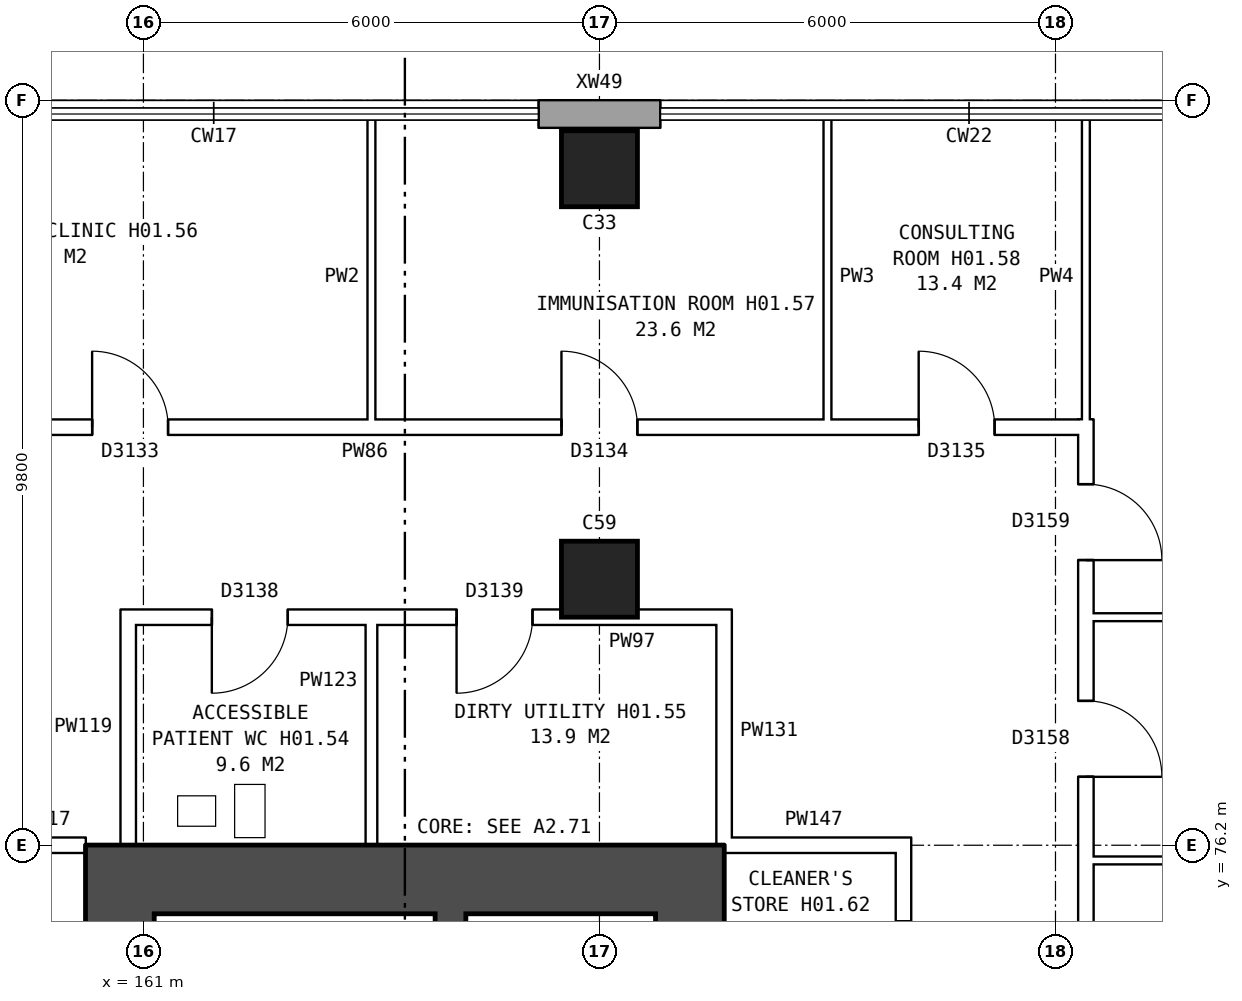
"""IFC4 building model, lengths in metres.
Left out: names, types, materials, properties, quantities, classifications, styles, units other than length and angle.
Written with IfcOpenShell. Run it as: python <this file> out.ifc"""

import sys

from ifc_helpers import new_model, si_unit, direction, frame, frame_2d, origin, origin_2d, place, context, subcontext, project, spatial, rectangle, extrude, element, fill, save


model = new_model("IFC4")
c1 = context("Model", 3, precision=1e-05, world=origin(), true_north=direction((0.0, 1.0)))
c2 = subcontext(c1, "Body", "Model", "MODEL_VIEW")
j1 = project(units=[si_unit("LENGTHUNIT", "METRE"), si_unit("PLANEANGLEUNIT", "RADIAN")], contexts=[c1])
p1 = place(None, origin())
s1 = spatial("IfcSite", under=j1, at=p1, CompositionType="ELEMENT")
p2 = place(p1, origin())
s2 = spatial("IfcBuilding", under=s1, at=p2, CompositionType="ELEMENT")
p3 = place(p2, frame((0.0, 0.0, 5.5)))
s3 = spatial("IfcBuildingStorey", under=s2, at=p3, CompositionType="ELEMENT", Elevation=5.5)
for number, where, z_axis, x_axis in (
    (1, (167.0, 79.7, 0.0), (0.0, 0.0, 1.0), (1.0, 0.0, 0.0)),
    (2, (167.0, 85.1, 0.0), (0.0, 0.0, 1.0), (1.0, 0.0, 0.0)),
):
    element("IfcColumn", number, at=place(p3, frame(where, z_axis=z_axis, x_axis=x_axis)), inside=s3, PredefinedType="COLUMN", context=c2, shape_type="SweptSolid", body=[
        extrude(rectangle(XDim=1.0, YDim=1.0, at=origin_2d()), origin(), (0.0, 0.0, 1.0), 4.3),
    ])
p4 = place(p3, frame((167.8, 85.82, 0.0), z_axis=(0.0, 0.0, 1.0), x_axis=(-1.0, 0.0, 0.0)))
e3 = element("IfcWall", 3, at=p4, inside=s3, PredefinedType="STANDARD", context=c2, shape_type="SweptSolid", body=[
    extrude(rectangle(XDim=1.6, YDim=0.36, at=frame_2d((0.8, 0.0))), origin(), (0.0, 0.0, 1.0), 4.3),
])
p5 = place(p3, frame((160.69, 75.3, 0.0), z_axis=(0.0, 0.0, 1.0), x_axis=(0.0, -1.0, 0.0)))
e4 = element("IfcWall", 4, at=p5, inside=s3, PredefinedType="SHEAR", context=c2, shape_type="SweptSolid", body=[
    extrude(rectangle(XDim=10.6, YDim=0.9, at=frame_2d((5.3, 0.0))), origin(), (0.0, 0.0, 1.0), 4.3),
])
p6 = place(p5, frame((0.425, 0.0, 0.0)))
e5 = element("IfcOpeningElement", 5, at=p6, cuts=e4, PredefinedType="OPENING", context=c2, shape_type="SweptSolid", body=[
    extrude(rectangle(XDim=1.1, YDim=2.1, at=frame_2d((0.55, 1.05))), frame((0.0, 0.46, 0.0), z_axis=(0.0, -1.0, 0.0), x_axis=(1.0, 0.0, 0.0)), (0.0, 0.0, 1.0), 0.92),
])
p7 = place(p5, frame((2.7, 0.0, 0.0)))
e6 = element("IfcOpeningElement", 6, at=p7, cuts=e4, PredefinedType="OPENING", context=c2, shape_type="SweptSolid", body=[
    extrude(rectangle(XDim=1.1, YDim=2.1, at=frame_2d((0.55, 1.05))), frame((0.0, 0.46, 0.0), z_axis=(0.0, -1.0, 0.0), x_axis=(1.0, 0.0, 0.0)), (0.0, 0.0, 1.0), 0.92),
])
p8 = place(p5, frame((4.9, 0.0, 0.0)))
e7 = element("IfcOpeningElement", 7, at=p8, cuts=e4, PredefinedType="OPENING", context=c2, shape_type="SweptSolid", body=[
    extrude(rectangle(XDim=1.1, YDim=2.1, at=frame_2d((0.55, 1.05))), frame((0.0, 0.46, 0.0), z_axis=(0.0, -1.0, 0.0), x_axis=(1.0, 0.0, 0.0)), (0.0, 0.0, 1.0), 0.92),
])
p9 = place(p5, frame((9.0, 0.0, 0.0)))
e8 = element("IfcOpeningElement", 8, at=p9, cuts=e4, PredefinedType="OPENING", context=c2, shape_type="SweptSolid", body=[
    extrude(rectangle(XDim=1.1, YDim=2.1, at=frame_2d((0.55, 1.05))), frame((0.0, 0.46, 0.0), z_axis=(0.0, -1.0, 0.0), x_axis=(1.0, 0.0, 0.0)), (0.0, 0.0, 1.0), 0.92),
])
p10 = place(p5, frame((7.225, 0.0, 0.0)))
e9 = element("IfcOpeningElement", 9, at=p10, cuts=e4, PredefinedType="OPENING", context=c2, shape_type="SweptSolid", body=[
    extrude(rectangle(XDim=0.85, YDim=2.1, at=frame_2d((0.425, 1.05))), frame((0.0, 0.46, 0.0), z_axis=(0.0, -1.0, 0.0), x_axis=(1.0, 0.0, 0.0)), (0.0, 0.0, 1.0), 0.92),
])
p11 = place(p3, frame((168.19, 75.3, 0.0), z_axis=(0.0, 0.0, 1.0), x_axis=(0.0, -1.0, 0.0)))
e10 = element("IfcWall", 10, at=p11, inside=s3, PredefinedType="SHEAR", context=c2, shape_type="SweptSolid", body=[
    extrude(rectangle(XDim=10.6, YDim=0.9, at=frame_2d((5.3, 0.0))), origin(), (0.0, 0.0, 1.0), 4.3),
])
p12 = place(p3, frame((160.24, 75.75, 0.0), z_axis=(0.0, 0.0, 1.0), x_axis=(1.0, 0.0, 0.0)))
e11 = element("IfcWall", 11, at=p12, inside=s3, PredefinedType="SHEAR", context=c2, shape_type="SweptSolid", body=[
    extrude(rectangle(XDim=8.4, YDim=0.9, at=frame_2d((4.2, 0.0))), origin(), (0.0, 0.0, 1.0), 4.3),
])
p13 = place(p3, frame((165.04, 75.3, 0.0), z_axis=(0.0, 0.0, 1.0), x_axis=(0.0, -1.0, 0.0)))
e12 = element("IfcWall", 12, at=p13, inside=s3, PredefinedType="SHEAR", context=c2, shape_type="SweptSolid", body=[
    extrude(rectangle(XDim=6.35, YDim=0.4, at=frame_2d((3.175, 0.0))), origin(), (0.0, 0.0, 1.0), 4.3),
])
p14 = place(p3, frame((173.3, 76.0, 0.0), z_axis=(0.0, 0.0, 1.0), x_axis=(1.0, 0.0, 0.0)))
e13 = element("IfcWall", 13, at=p14, inside=s3, PredefinedType="PARTITIONING", context=c2, shape_type="SweptSolid", body=[
    extrude(rectangle(XDim=5.46, YDim=0.1, at=frame_2d((2.73, 0.0))), origin(), (0.0, 0.0, 1.0), 4.3),
])
p15 = place(p3, frame((168.54, 76.2, 0.0), z_axis=(0.0, 0.0, 1.0), x_axis=(1.0, 0.0, 0.0)))
e14 = element("IfcWall", 14, at=p15, inside=s3, PredefinedType="PARTITIONING", context=c2, shape_type="SweptSolid", body=[
    extrude(rectangle(XDim=2.56, YDim=0.2, at=frame_2d((1.28, 0.0))), origin(), (0.0, 0.0, 1.0), 4.3),
])
p16 = place(p3, frame((157.65, 76.2, 0.0), z_axis=(0.0, 0.0, 1.0), x_axis=(1.0, 0.0, 0.0)))
e15 = element("IfcWall", 15, at=p16, inside=s3, PredefinedType="PARTITIONING", context=c2, shape_type="SweptSolid", body=[
    extrude(rectangle(XDim=2.59, YDim=0.2, at=frame_2d((1.295, 0.0))), origin(), (0.0, 0.0, 1.0), 4.3),
])
p17 = place(p16, frame((0.59, 0.0, 0.0)))
e16 = element("IfcOpeningElement", 16, at=p17, cuts=e15, PredefinedType="OPENING", context=c2, shape_type="SweptSolid", body=[
    extrude(rectangle(XDim=1.0, YDim=2.1, at=frame_2d((0.5, 1.05))), frame((0.0, 0.11, 0.0), z_axis=(0.0, -1.0, 0.0), x_axis=(1.0, 0.0, 0.0)), (0.0, 0.0, 1.0), 0.22),
])
p18 = place(p3, frame((160.7, 79.2, 0.0), z_axis=(0.0, 0.0, 1.0), x_axis=(1.0, 0.0, 0.0)))
e17 = element("IfcWall", 17, at=p18, inside=s3, PredefinedType="PARTITIONING", context=c2, shape_type="SweptSolid", body=[
    extrude(rectangle(XDim=8.04, YDim=0.2, at=frame_2d((4.02, 0.0))), origin(), (0.0, 0.0, 1.0), 4.3),
])
p19 = place(p18, frame((1.2, 0.0, 0.0)))
e18 = element("IfcOpeningElement", 18, at=p19, cuts=e17, PredefinedType="OPENING", context=c2, shape_type="SweptSolid", body=[
    extrude(rectangle(XDim=1.0, YDim=2.1, at=frame_2d((0.5, 1.05))), frame((0.0, 0.11, 0.0), z_axis=(0.0, -1.0, 0.0), x_axis=(1.0, 0.0, 0.0)), (0.0, 0.0, 1.0), 0.22),
])
p20 = place(p18, frame((4.42, 0.0, 0.0)))
e19 = element("IfcOpeningElement", 19, at=p20, cuts=e17, PredefinedType="OPENING", context=c2, shape_type="SweptSolid", body=[
    extrude(rectangle(XDim=1.0, YDim=2.1, at=frame_2d((0.5, 1.05))), frame((0.0, 0.11, 0.0), z_axis=(0.0, -1.0, 0.0), x_axis=(1.0, 0.0, 0.0)), (0.0, 0.0, 1.0), 0.22),
])
p21 = place(p3, frame((173.3, 79.2, 0.0), z_axis=(0.0, 0.0, 1.0), x_axis=(1.0, 0.0, 0.0)))
e20 = element("IfcWall", 20, at=p21, inside=s3, PredefinedType="PARTITIONING", context=c2, shape_type="SweptSolid", body=[
    extrude(rectangle(XDim=5.46, YDim=0.1, at=frame_2d((2.73, 0.0))), origin(), (0.0, 0.0, 1.0), 4.3),
])
p22 = place(p3, frame((157.53, 81.7, 0.0), z_axis=(0.0, 0.0, 1.0), x_axis=(1.0, 0.0, 0.0)))
e21 = element("IfcWall", 21, at=p22, inside=s3, PredefinedType="PARTITIONING", context=c2, shape_type="SweptSolid", body=[
    extrude(rectangle(XDim=15.97, YDim=0.2, at=frame_2d((7.985, 0.0))), origin(), (0.0, 0.0, 1.0), 4.3),
])
p23 = place(p22, frame((2.795, 0.0, 0.0)))
e22 = element("IfcOpeningElement", 22, at=p23, cuts=e21, PredefinedType="OPENING", context=c2, shape_type="SweptSolid", body=[
    extrude(rectangle(XDim=1.0, YDim=2.1, at=frame_2d((0.5, 1.05))), frame((0.0, 0.11, 0.0), z_axis=(0.0, -1.0, 0.0), x_axis=(1.0, 0.0, 0.0)), (0.0, 0.0, 1.0), 0.22),
])
p24 = place(p22, frame((8.97, 0.0, 0.0)))
e23 = element("IfcOpeningElement", 23, at=p24, cuts=e21, PredefinedType="OPENING", context=c2, shape_type="SweptSolid", body=[
    extrude(rectangle(XDim=1.0, YDim=2.1, at=frame_2d((0.5, 1.05))), frame((0.0, 0.11, 0.0), z_axis=(0.0, -1.0, 0.0), x_axis=(1.0, 0.0, 0.0)), (0.0, 0.0, 1.0), 0.22),
])
p25 = place(p22, frame((13.67, 0.0, 0.0)))
e24 = element("IfcOpeningElement", 24, at=p25, cuts=e21, PredefinedType="OPENING", context=c2, shape_type="SweptSolid", body=[
    extrude(rectangle(XDim=1.0, YDim=2.1, at=frame_2d((0.5, 1.05))), frame((0.0, 0.11, 0.0), z_axis=(0.0, -1.0, 0.0), x_axis=(1.0, 0.0, 0.0)), (0.0, 0.0, 1.0), 0.22),
])
p26 = place(p3, frame((160.8, 76.2, 0.0), z_axis=(0.0, 0.0, 1.0), x_axis=(0.0, 1.0, 0.0)))
e25 = element("IfcWall", 25, at=p26, inside=s3, PredefinedType="PARTITIONING", context=c2, shape_type="SweptSolid", body=[
    extrude(rectangle(XDim=3.1, YDim=0.2, at=frame_2d((1.55, 0.0))), origin(), (0.0, 0.0, 1.0), 4.3),
])
p27 = place(p3, frame((164.0, 81.6, 0.0), z_axis=(0.0, 0.0, 1.0), x_axis=(0.0, 1.0, 0.0)))
e26 = element("IfcWall", 26, at=p27, inside=s3, PredefinedType="PARTITIONING", context=c2, shape_type="SweptSolid", body=[
    extrude(rectangle(XDim=4.16, YDim=0.1, at=frame_2d((2.08, 0.0))), origin(), (0.0, 0.0, 1.0), 4.3),
])
p28 = place(p3, frame((164.0, 76.2, 0.0), z_axis=(0.0, 0.0, 1.0), x_axis=(0.0, 1.0, 0.0)))
e27 = element("IfcWall", 27, at=p28, inside=s3, PredefinedType="PLUMBINGWALL", context=c2, shape_type="SweptSolid", body=[
    extrude(rectangle(XDim=3.1, YDim=0.15, at=frame_2d((1.55, 0.0))), origin(), (0.0, 0.0, 1.0), 4.3),
])
p29 = place(p3, frame((168.64, 76.1, 0.0), z_axis=(0.0, 0.0, 1.0), x_axis=(0.0, 1.0, 0.0)))
e28 = element("IfcWall", 28, at=p29, inside=s3, PredefinedType="PARTITIONING", context=c2, shape_type="SweptSolid", body=[
    extrude(rectangle(XDim=3.2, YDim=0.2, at=frame_2d((1.6, 0.0))), origin(), (0.0, 0.0, 1.0), 4.3),
])
p30 = place(p3, frame((170.0, 81.6, 0.0), z_axis=(0.0, 0.0, 1.0), x_axis=(0.0, 1.0, 0.0)))
e29 = element("IfcWall", 29, at=p30, inside=s3, PredefinedType="PARTITIONING", context=c2, shape_type="SweptSolid", body=[
    extrude(rectangle(XDim=4.16, YDim=0.1, at=frame_2d((2.08, 0.0))), origin(), (0.0, 0.0, 1.0), 4.3),
])
p31 = place(p3, frame((171.0, 69.9, 0.0), z_axis=(0.0, 0.0, 1.0), x_axis=(0.0, 1.0, 0.0)))
e30 = element("IfcWall", 30, at=p31, inside=s3, PredefinedType="PARTITIONING", context=c2, shape_type="SweptSolid", body=[
    extrude(rectangle(XDim=6.4, YDim=0.2, at=frame_2d((3.2, 0.0))), origin(), (0.0, 0.0, 1.0), 4.3),
])
p32 = place(p31, frame((1.2, 0.0, 0.0)))
e31 = element("IfcOpeningElement", 31, at=p32, cuts=e30, PredefinedType="OPENING", context=c2, shape_type="SweptSolid", body=[
    extrude(rectangle(XDim=1.0, YDim=2.1, at=frame_2d((0.5, 1.05))), frame((0.0, 0.11, 0.0), z_axis=(0.0, -1.0, 0.0), x_axis=(1.0, 0.0, 0.0)), (0.0, 0.0, 1.0), 0.22),
])
p33 = place(p31, frame((4.3, 0.0, 0.0)))
e32 = element("IfcOpeningElement", 32, at=p33, cuts=e30, PredefinedType="OPENING", context=c2, shape_type="SweptSolid", body=[
    extrude(rectangle(XDim=1.0, YDim=2.1, at=frame_2d((0.5, 1.05))), frame((0.0, 0.11, 0.0), z_axis=(0.0, -1.0, 0.0), x_axis=(1.0, 0.0, 0.0)), (0.0, 0.0, 1.0), 0.22),
])
p34 = place(p3, frame((173.4, 58.198, 0.0), z_axis=(0.0, 0.0, 1.0), x_axis=(0.0, 1.0, 0.0)))
e33 = element("IfcWall", 33, at=p34, inside=s3, PredefinedType="PARTITIONING", context=c2, shape_type="SweptSolid", body=[
    extrude(rectangle(XDim=23.604, YDim=0.2, at=frame_2d((11.802, 0.0))), origin(), (0.0, 0.0, 1.0), 4.3),
])
p35 = place(p34, frame((0.851, 0.0, 0.0)))
e34 = element("IfcOpeningElement", 34, at=p35, cuts=e33, PredefinedType="OPENING", context=c2, shape_type="SweptSolid", body=[
    extrude(rectangle(XDim=1.0, YDim=2.1, at=frame_2d((0.5, 1.05))), frame((0.0, 0.11, 0.0), z_axis=(0.0, -1.0, 0.0), x_axis=(1.0, 0.0, 0.0)), (0.0, 0.0, 1.0), 0.22),
])
p36 = place(p34, frame((3.702, 0.0, 0.0)))
e35 = element("IfcOpeningElement", 35, at=p36, cuts=e33, PredefinedType="OPENING", context=c2, shape_type="SweptSolid", body=[
    extrude(rectangle(XDim=1.0, YDim=2.1, at=frame_2d((0.5, 1.05))), frame((0.0, 0.11, 0.0), z_axis=(0.0, -1.0, 0.0), x_axis=(1.0, 0.0, 0.0)), (0.0, 0.0, 1.0), 0.22),
])
p37 = place(p34, frame((6.802, 0.0, 0.0)))
e36 = element("IfcOpeningElement", 36, at=p37, cuts=e33, PredefinedType="OPENING", context=c2, shape_type="SweptSolid", body=[
    extrude(rectangle(XDim=1.0, YDim=2.1, at=frame_2d((0.5, 1.05))), frame((0.0, 0.11, 0.0), z_axis=(0.0, -1.0, 0.0), x_axis=(1.0, 0.0, 0.0)), (0.0, 0.0, 1.0), 0.22),
])
p38 = place(p34, frame((9.802, 0.0, 0.0)))
e37 = element("IfcOpeningElement", 37, at=p38, cuts=e33, PredefinedType="OPENING", context=c2, shape_type="SweptSolid", body=[
    extrude(rectangle(XDim=1.0, YDim=2.1, at=frame_2d((0.5, 1.05))), frame((0.0, 0.11, 0.0), z_axis=(0.0, -1.0, 0.0), x_axis=(1.0, 0.0, 0.0)), (0.0, 0.0, 1.0), 0.22),
])
p39 = place(p34, frame((12.802, 0.0, 0.0)))
e38 = element("IfcOpeningElement", 38, at=p39, cuts=e33, PredefinedType="OPENING", context=c2, shape_type="SweptSolid", body=[
    extrude(rectangle(XDim=1.0, YDim=2.1, at=frame_2d((0.5, 1.05))), frame((0.0, 0.11, 0.0), z_axis=(0.0, -1.0, 0.0), x_axis=(1.0, 0.0, 0.0)), (0.0, 0.0, 1.0), 0.22),
])
p40 = place(p34, frame((15.802, 0.0, 0.0)))
e39 = element("IfcOpeningElement", 39, at=p40, cuts=e33, PredefinedType="OPENING", context=c2, shape_type="SweptSolid", body=[
    extrude(rectangle(XDim=1.0, YDim=2.1, at=frame_2d((0.5, 1.05))), frame((0.0, 0.11, 0.0), z_axis=(0.0, -1.0, 0.0), x_axis=(1.0, 0.0, 0.0)), (0.0, 0.0, 1.0), 0.22),
])
p41 = place(p34, frame((18.902, 0.0, 0.0)))
e40 = element("IfcOpeningElement", 40, at=p41, cuts=e33, PredefinedType="OPENING", context=c2, shape_type="SweptSolid", body=[
    extrude(rectangle(XDim=1.0, YDim=2.1, at=frame_2d((0.5, 1.05))), frame((0.0, 0.11, 0.0), z_axis=(0.0, -1.0, 0.0), x_axis=(1.0, 0.0, 0.0)), (0.0, 0.0, 1.0), 0.22),
])
p42 = place(p34, frame((21.753, 0.0, 0.0)))
e41 = element("IfcOpeningElement", 41, at=p42, cuts=e33, PredefinedType="OPENING", context=c2, shape_type="SweptSolid", body=[
    extrude(rectangle(XDim=1.0, YDim=2.1, at=frame_2d((0.5, 1.05))), frame((0.0, 0.11, 0.0), z_axis=(0.0, -1.0, 0.0), x_axis=(1.0, 0.0, 0.0)), (0.0, 0.0, 1.0), 0.22),
])
p43 = place(p3, frame((173.4, 81.598, 0.0), z_axis=(0.0, 0.0, 1.0), x_axis=(0.0, 1.0, 0.0)))
e42 = element("IfcWall", 42, at=p43, inside=s3, PredefinedType="PARTITIONING", context=c2, shape_type="SweptSolid", body=[
    extrude(rectangle(XDim=4.162, YDim=0.1, at=frame_2d((2.081, 0.0))), origin(), (0.0, 0.0, 1.0), 4.3),
])
p44 = place(p19, frame((1.0, 0.0, 0.0), z_axis=(0.0, 0.0, 1.0), x_axis=(-1.0, 0.0, 0.0)))
e43 = element("IfcDoor", 43, at=p44, inside=s3, OperationType="SINGLE_SWING_RIGHT", PredefinedType="DOOR", context=c2, shape_type="SweptSolid", body=[
    extrude(rectangle(XDim=1.0, YDim=2.1, at=frame_2d((0.5, 1.05))), frame((0.0, 0.025, 0.0), z_axis=(0.0, -1.0, 0.0), x_axis=(1.0, 0.0, 0.0)), (0.0, 0.0, 1.0), 0.05),
])
fill(e18, e43)
p45 = place(p20, frame((1.0, 0.0, 0.0), z_axis=(0.0, 0.0, 1.0), x_axis=(-1.0, 0.0, 0.0)))
e44 = element("IfcDoor", 44, at=p45, inside=s3, OperationType="SINGLE_SWING_RIGHT", PredefinedType="DOOR", context=c2, shape_type="SweptSolid", body=[
    extrude(rectangle(XDim=1.0, YDim=2.1, at=frame_2d((0.5, 1.05))), frame((0.0, 0.025, 0.0), z_axis=(0.0, -1.0, 0.0), x_axis=(1.0, 0.0, 0.0)), (0.0, 0.0, 1.0), 0.05),
])
fill(e19, e44)
p46 = place(p23, origin())
e45 = element("IfcDoor", 45, at=p46, inside=s3, OperationType="SINGLE_SWING_LEFT", PredefinedType="DOOR", context=c2, shape_type="SweptSolid", body=[
    extrude(rectangle(XDim=1.0, YDim=2.1, at=frame_2d((0.5, 1.05))), frame((0.0, 0.025, 0.0), z_axis=(0.0, -1.0, 0.0), x_axis=(1.0, 0.0, 0.0)), (0.0, 0.0, 1.0), 0.05),
])
fill(e22, e45)
p47 = place(p24, origin())
e46 = element("IfcDoor", 46, at=p47, inside=s3, OperationType="SINGLE_SWING_LEFT", PredefinedType="DOOR", context=c2, shape_type="SweptSolid", body=[
    extrude(rectangle(XDim=1.0, YDim=2.1, at=frame_2d((0.5, 1.05))), frame((0.0, 0.025, 0.0), z_axis=(0.0, -1.0, 0.0), x_axis=(1.0, 0.0, 0.0)), (0.0, 0.0, 1.0), 0.05),
])
fill(e23, e46)
p48 = place(p25, origin())
e47 = element("IfcDoor", 47, at=p48, inside=s3, OperationType="SINGLE_SWING_LEFT", PredefinedType="DOOR", context=c2, shape_type="SweptSolid", body=[
    extrude(rectangle(XDim=1.0, YDim=2.1, at=frame_2d((0.5, 1.05))), frame((0.0, 0.025, 0.0), z_axis=(0.0, -1.0, 0.0), x_axis=(1.0, 0.0, 0.0)), (0.0, 0.0, 1.0), 0.05),
])
fill(e24, e47)
p49 = place(p41, frame((1.0, 0.0, 0.0), z_axis=(0.0, 0.0, 1.0), x_axis=(-1.0, 0.0, 0.0)))
e48 = element("IfcDoor", 48, at=p49, inside=s3, OperationType="SINGLE_SWING_RIGHT", PredefinedType="DOOR", context=c2, shape_type="SweptSolid", body=[
    extrude(rectangle(XDim=1.0, YDim=2.1, at=frame_2d((0.5, 1.05))), frame((0.0, 0.025, 0.0), z_axis=(0.0, -1.0, 0.0), x_axis=(1.0, 0.0, 0.0)), (0.0, 0.0, 1.0), 0.05),
])
fill(e40, e48)
p50 = place(p42, frame((1.0, 0.0, 0.0), z_axis=(0.0, 0.0, 1.0), x_axis=(-1.0, 0.0, 0.0)))
e49 = element("IfcDoor", 49, at=p50, inside=s3, OperationType="SINGLE_SWING_RIGHT", PredefinedType="DOOR", context=c2, shape_type="SweptSolid", body=[
    extrude(rectangle(XDim=1.0, YDim=2.1, at=frame_2d((0.5, 1.05))), frame((0.0, 0.025, 0.0), z_axis=(0.0, -1.0, 0.0), x_axis=(1.0, 0.0, 0.0)), (0.0, 0.0, 1.0), 0.05),
])
fill(e41, e49)
save(model, sys.argv[1])
